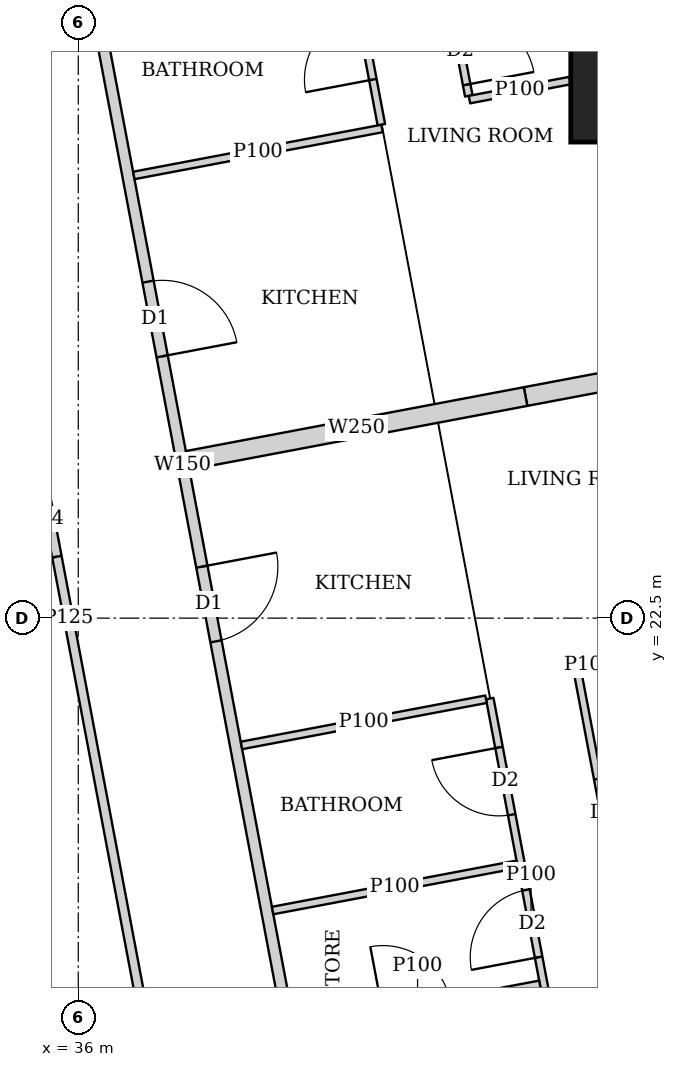
"""IFC4 building model, lengths in metres.
Left out: names, types, materials, properties, quantities, classifications, styles, units other than length and angle.
Written with IfcOpenShell. Run it as: python <this file> out.ifc"""

import sys

from ifc_helpers import new_model, si_unit, direction, frame, frame_2d, origin, origin_2d, place, context, subcontext, project, spatial, rectangle, extrude, element, fill, save


model = new_model("IFC4")
c1 = context("Model", 3, precision=1e-05, world=origin(), true_north=direction((0.0, 1.0)))
c2 = subcontext(c1, "Body", "Model", "MODEL_VIEW")
j1 = project(units=[si_unit("LENGTHUNIT", "METRE"), si_unit("PLANEANGLEUNIT", "RADIAN")], contexts=[c1])
p1 = place(None, origin())
s1 = spatial("IfcSite", under=j1, at=p1, CompositionType="ELEMENT")
p2 = place(p1, origin())
s2 = spatial("IfcBuilding", under=s1, at=p2, CompositionType="ELEMENT")
p3 = place(p2, frame((0.0, 0.0, 266.6)))
s3 = spatial("IfcBuildingStorey", under=s2, at=p3, CompositionType="ELEMENT", Elevation=266.6)
p4 = place(p3, frame((43.48, 29.763, 0.0), z_axis=(0.0, 0.0, 1.0), x_axis=(1.0, 0.0, 0.0)))
e1 = element("IfcColumn", 1, at=p4, inside=s3, PredefinedType="COLUMN", context=c2, shape_type="SweptSolid", body=[
    extrude(rectangle(XDim=2.0, YDim=2.0, at=origin_2d()), origin(), (0.0, 0.0, 1.0), 3.75),
])
p5 = place(p3, frame((34.036, 42.186, 0.0), z_axis=(0.0, 0.0, 1.0), x_axis=(0.185593518645, -0.9826266055, 0.0)))
e2 = element("IfcWall", 2, at=p5, inside=s3, PredefinedType="SOLIDWALL", context=c2, shape_type="SweptSolid", body=[
    extrude(rectangle(XDim=35.961, YDim=0.15, at=frame_2d((17.98, 0.0))), origin(), (0.0, 0.0, 1.0), 2.5),
])
p6 = place(p5, frame((15.529, 0.0, 0.0)))
e3 = element("IfcOpeningElement", 3, at=p6, cuts=e2, PredefinedType="OPENING", context=c2, shape_type="SweptSolid", body=[
    extrude(rectangle(XDim=1.0, YDim=2.1, at=frame_2d((0.5, 1.05))), frame((0.0, 0.085, 0.0), z_axis=(0.0, -1.0, 0.0), x_axis=(1.0, 0.0, 0.0)), (0.0, 0.0, 1.0), 0.17),
])
p7 = place(p5, frame((19.345, 0.0, 0.0)))
e4 = element("IfcOpeningElement", 4, at=p7, cuts=e2, PredefinedType="OPENING", context=c2, shape_type="SweptSolid", body=[
    extrude(rectangle(XDim=1.0, YDim=2.1, at=frame_2d((0.5, 1.05))), frame((0.0, 0.085, 0.0), z_axis=(0.0, -1.0, 0.0), x_axis=(1.0, 0.0, 0.0)), (0.0, 0.0, 1.0), 0.17),
])
p8 = place(p5, frame((30.594, 0.0, 0.0)))
e5 = element("IfcOpeningElement", 5, at=p8, cuts=e2, PredefinedType="OPENING", context=c2, shape_type="SweptSolid", body=[
    extrude(rectangle(XDim=1.0, YDim=2.1, at=frame_2d((0.5, 1.05))), frame((0.0, 0.085, 0.0), z_axis=(0.0, -1.0, 0.0), x_axis=(1.0, 0.0, 0.0)), (0.0, 0.0, 1.0), 0.17),
])
p9 = place(p3, frame((38.744, 42.045, 0.0), z_axis=(0.0, 0.0, 1.0), x_axis=(0.185614085367, -0.982622720739, 0.0)))
e6 = element("IfcWall", 6, at=p9, inside=s3, PredefinedType="PARTITIONING", context=c2, shape_type="SweptSolid", body=[
    extrude(rectangle(XDim=12.898, YDim=0.1, at=frame_2d((6.449, 0.0))), origin(), (0.0, 0.0, 1.0), 2.5),
])
p10 = place(p9, frame((11.848, 0.0, 0.0)))
e7 = element("IfcOpeningElement", 7, at=p10, cuts=e6, PredefinedType="OPENING", context=c2, shape_type="SweptSolid", body=[
    extrude(rectangle(XDim=0.9, YDim=2.1, at=frame_2d((0.45, 1.05))), frame((0.0, 0.06, 0.0), z_axis=(0.0, -1.0, 0.0), x_axis=(1.0, 0.0, 0.0)), (0.0, 0.0, 1.0), 0.12),
])
p11 = place(p9, frame((8.191, 0.0, 0.0)))
e8 = element("IfcOpeningElement", 8, at=p11, cuts=e6, PredefinedType="OPENING", context=c2, shape_type="SweptSolid", body=[
    extrude(rectangle(XDim=0.9, YDim=2.1, at=frame_2d((0.45, 1.05))), frame((0.0, 0.06, 0.0), z_axis=(0.0, -1.0, 0.0), x_axis=(1.0, 0.0, 0.0)), (0.0, 0.0, 1.0), 0.12),
])
p12 = place(p9, frame((4.215, 0.0, 0.0)))
e9 = element("IfcOpeningElement", 9, at=p12, cuts=e6, PredefinedType="OPENING", context=c2, shape_type="SweptSolid", body=[
    extrude(rectangle(XDim=0.9, YDim=2.1, at=frame_2d((0.45, 1.05))), frame((0.0, 0.06, 0.0), z_axis=(0.0, -1.0, 0.0), x_axis=(1.0, 0.0, 0.0)), (0.0, 0.0, 1.0), 0.12),
])
p13 = place(p3, frame((37.511, 42.109, 0.0), z_axis=(0.0, 0.0, 1.0), x_axis=(0.185550464988, -0.982634736279, 0.0)))
e10 = element("IfcWall", 10, at=p13, inside=s3, PredefinedType="PARTITIONING", context=c2, shape_type="SweptSolid", body=[
    extrude(rectangle(XDim=13.35, YDim=0.1, at=frame_2d((6.675, 0.0))), origin(), (0.0, 0.0, 1.0), 2.5),
])
p14 = place(p13, frame((11.845, 0.0, 0.0)))
e11 = element("IfcOpeningElement", 11, at=p14, cuts=e10, PredefinedType="OPENING", context=c2, shape_type="SweptSolid", body=[
    extrude(rectangle(XDim=0.9, YDim=2.1, at=frame_2d((0.45, 1.05))), frame((0.0, 0.06, 0.0), z_axis=(0.0, -1.0, 0.0), x_axis=(1.0, 0.0, 0.0)), (0.0, 0.0, 1.0), 0.12),
])
p15 = place(p13, frame((8.224, 0.0, 0.0)))
e12 = element("IfcOpeningElement", 12, at=p15, cuts=e10, PredefinedType="OPENING", context=c2, shape_type="SweptSolid", body=[
    extrude(rectangle(XDim=0.9, YDim=2.1, at=frame_2d((0.45, 1.05))), frame((0.0, 0.06, 0.0), z_axis=(0.0, -1.0, 0.0), x_axis=(1.0, 0.0, 0.0)), (0.0, 0.0, 1.0), 0.12),
])
p16 = place(p13, frame((2.65, 0.0, 0.0)))
e13 = element("IfcOpeningElement", 13, at=p16, cuts=e10, PredefinedType="OPENING", context=c2, shape_type="SweptSolid", body=[
    extrude(rectangle(XDim=0.9, YDim=2.1, at=frame_2d((0.45, 1.05))), frame((0.0, 0.06, 0.0), z_axis=(0.0, -1.0, 0.0), x_axis=(1.0, 0.0, 0.0)), (0.0, 0.0, 1.0), 0.12),
])
p17 = place(p13, frame((9.936, 0.0, 0.0)))
e14 = element("IfcOpeningElement", 14, at=p17, cuts=e10, PredefinedType="OPENING", context=c2, shape_type="SweptSolid", body=[
    extrude(rectangle(XDim=0.9, YDim=2.1, at=frame_2d((0.45, 1.05))), frame((0.0, 0.06, 0.0), z_axis=(0.0, -1.0, 0.0), x_axis=(1.0, 0.0, 0.0)), (0.0, 0.0, 1.0), 0.12),
])
p18 = place(p13, frame((5.555, 0.0, 0.0)))
e15 = element("IfcOpeningElement", 15, at=p18, cuts=e10, PredefinedType="OPENING", context=c2, shape_type="SweptSolid", body=[
    extrude(rectangle(XDim=0.9, YDim=2.1, at=frame_2d((0.45, 1.05))), frame((0.0, 0.06, 0.0), z_axis=(0.0, -1.0, 0.0), x_axis=(1.0, 0.0, 0.0)), (0.0, 0.0, 1.0), 0.12),
])
p19 = place(p3, frame((42.47, 29.572, 0.0), z_axis=(0.0, 0.0, 1.0), x_axis=(-0.982610503289, -0.185678751683, 0.0)))
e16 = element("IfcWall", 16, at=p19, inside=s3, PredefinedType="PARTITIONING", context=c2, shape_type="SweptSolid", body=[
    extrude(rectangle(XDim=1.346, YDim=0.1, at=frame_2d((0.673, 0.0))), origin(), (0.0, 0.0, 1.0), 2.5),
])
p20 = place(p3, frame((39.997, 28.942, 0.0), z_axis=(0.0, 0.0, 1.0), x_axis=(-0.982569883123, -0.185893584556, 0.0)))
e17 = element("IfcWall", 17, at=p20, inside=s3, PredefinedType="PARTITIONING", context=c2, shape_type="SweptSolid", body=[
    extrude(rectangle(XDim=3.324, YDim=0.1, at=frame_2d((1.662, 0.0))), origin(), (0.0, 0.0, 1.0), 3.5),
])
p21 = place(p3, frame((42.566, 21.809, 0.0), z_axis=(0.0, 0.0, 1.0), x_axis=(0.185613526435, -0.98262282632, 0.0)))
e18 = element("IfcWall", 18, at=p21, inside=s3, PredefinedType="PARTITIONING", context=c2, shape_type="SweptSolid", body=[
    extrude(rectangle(XDim=6.207, YDim=0.1, at=frame_2d((3.104, 0.0))), origin(), (0.0, 0.0, 1.0), 2.5),
])
p22 = place(p21, frame((1.45, 0.0, 0.0)))
e19 = element("IfcOpeningElement", 19, at=p22, cuts=e18, PredefinedType="OPENING", context=c2, shape_type="SweptSolid", body=[
    extrude(rectangle(XDim=0.9, YDim=2.1, at=frame_2d((0.45, 1.05))), frame((0.0, 0.06, 0.0), z_axis=(0.0, -1.0, 0.0), x_axis=(1.0, 0.0, 0.0)), (0.0, 0.0, 1.0), 0.12),
])
p23 = place(p21, frame((4.163, 0.0, 0.0)))
e20 = element("IfcOpeningElement", 20, at=p23, cuts=e18, PredefinedType="OPENING", context=c2, shape_type="SweptSolid", body=[
    extrude(rectangle(XDim=0.9, YDim=2.1, at=frame_2d((0.45, 1.05))), frame((0.0, 0.06, 0.0), z_axis=(0.0, -1.0, 0.0), x_axis=(1.0, 0.0, 0.0)), (0.0, 0.0, 1.0), 0.12),
])
p24 = place(p3, frame((41.414, 21.442, 0.0), z_axis=(0.0, 0.0, 1.0), x_axis=(0.185698675093, -0.982606738257, 0.0)))
e21 = element("IfcWall", 21, at=p24, inside=s3, PredefinedType="PARTITIONING", context=c2, shape_type="SweptSolid", body=[
    extrude(rectangle(XDim=5.843, YDim=0.1, at=frame_2d((2.921, 0.0))), origin(), (0.0, 0.0, 1.0), 3.5),
])
p25 = place(p24, frame((0.655, 0.0, 0.0)))
e22 = element("IfcOpeningElement", 22, at=p25, cuts=e21, PredefinedType="OPENING", context=c2, shape_type="SweptSolid", body=[
    extrude(rectangle(XDim=0.9, YDim=2.1, at=frame_2d((0.45, 1.05))), frame((0.0, 0.06, 0.0), z_axis=(0.0, -1.0, 0.0), x_axis=(1.0, 0.0, 0.0)), (0.0, 0.0, 1.0), 0.12),
])
p26 = place(p24, frame((2.563, 0.0, 0.0)))
e23 = element("IfcOpeningElement", 23, at=p26, cuts=e21, PredefinedType="OPENING", context=c2, shape_type="SweptSolid", body=[
    extrude(rectangle(XDim=0.9, YDim=2.1, at=frame_2d((0.45, 1.05))), frame((0.0, 0.06, 0.0), z_axis=(0.0, -1.0, 0.0), x_axis=(1.0, 0.0, 0.0)), (0.0, 0.0, 1.0), 0.12),
])
p27 = place(p3, frame((42.887, 21.921, 0.0), z_axis=(0.0, 0.0, 1.0), x_axis=(-0.982274918032, -0.187445953293, 0.0)))
e24 = element("IfcWall", 24, at=p27, inside=s3, PredefinedType="PARTITIONING", context=c2, shape_type="SweptSolid", body=[
    extrude(rectangle(XDim=0.336, YDim=0.1, at=frame_2d((0.168, 0.0))), origin(), (0.0, 0.0, 1.0), 2.5),
])
p28 = place(p3, frame((41.365, 21.433, 0.0), z_axis=(0.0, 0.0, 1.0), x_axis=(-0.982607026909, -0.185697147715, 0.0)))
e25 = element("IfcWall", 25, at=p28, inside=s3, PredefinedType="PARTITIONING", context=c2, shape_type="SweptSolid", body=[
    extrude(rectangle(XDim=3.275, YDim=0.1, at=frame_2d((1.637, 0.0))), origin(), (0.0, 0.0, 1.0), 3.5),
])
p29 = place(p3, frame((42.073, 17.682, 0.0), z_axis=(0.0, 0.0, 1.0), x_axis=(-0.982620626894, -0.185625169636, 0.0)))
e26 = element("IfcWall", 26, at=p29, inside=s3, PredefinedType="PARTITIONING", context=c2, shape_type="SweptSolid", body=[
    extrude(rectangle(XDim=3.275, YDim=0.1, at=frame_2d((1.637, 0.0))), origin(), (0.0, 0.0, 1.0), 3.5),
])
p30 = place(p29, frame((1.2, 0.0, 0.0)))
e27 = element("IfcOpeningElement", 27, at=p30, cuts=e26, PredefinedType="OPENING", context=c2, shape_type="SweptSolid", body=[
    extrude(rectangle(XDim=0.9, YDim=2.1, at=frame_2d((0.45, 1.05))), frame((0.0, 0.06, 0.0), z_axis=(0.0, -1.0, 0.0), x_axis=(1.0, 0.0, 0.0)), (0.0, 0.0, 1.0), 0.12),
])
p31 = place(p3, frame((41.775, 19.261, 0.0), z_axis=(0.0, 0.0, 1.0), x_axis=(-0.982620626894, -0.185625169636, 0.0)))
e28 = element("IfcWall", 28, at=p31, inside=s3, PredefinedType="PARTITIONING", context=c2, shape_type="SweptSolid", body=[
    extrude(rectangle(XDim=3.275, YDim=0.1, at=frame_2d((1.637, 0.0))), origin(), (0.0, 0.0, 1.0), 3.5),
])
p32 = place(p3, frame((46.11, 26.213, 0.0), z_axis=(0.0, 0.0, 1.0), x_axis=(-0.982633535512, -0.185556823879, 0.0)))
e29 = element("IfcWall", 29, at=p32, inside=s3, PredefinedType="SOLIDWALL", context=c2, shape_type="SweptSolid", body=[
    extrude(rectangle(XDim=4.3, YDim=0.25, at=frame_2d((2.15, 0.0))), origin(), (0.0, 0.0, 1.0), 2.5),
])
p33 = place(p3, frame((41.885, 25.415, 0.0), z_axis=(0.0, 0.0, 1.0), x_axis=(-0.982612837616, -0.185666398014, 0.0)))
e30 = element("IfcWall", 30, at=p33, inside=s3, PredefinedType="SOLIDWALL", context=c2, shape_type="SweptSolid", body=[
    extrude(rectangle(XDim=4.525, YDim=0.25, at=frame_2d((2.262, 0.0))), origin(), (0.0, 0.0, 1.0), 3.5),
])
p34 = place(p3, frame((38.202, 10.163, 0.0), z_axis=(0.0, 0.0, 1.0), x_axis=(-0.185610321132, 0.982623431783, 0.0)))
e31 = element("IfcWall", 31, at=p34, inside=s3, PredefinedType="PARTITIONING", context=c2, shape_type="SweptSolid", body=[
    extrude(rectangle(XDim=25.111, YDim=0.125, at=frame_2d((12.556, 0.0))), origin(), (0.0, 0.0, 1.0), 2.5),
])
p35 = place(p34, frame((0.708, 0.0, 0.0)))
e32 = element("IfcOpeningElement", 32, at=p35, cuts=e31, PredefinedType="OPENING", context=c2, shape_type="SweptSolid", body=[
    extrude(rectangle(XDim=1.0, YDim=2.1, at=frame_2d((0.5, 1.05))), frame((0.0, 0.073, 0.0), z_axis=(0.0, -1.0, 0.0), x_axis=(1.0, 0.0, 0.0)), (0.0, 0.0, 1.0), 0.145),
])
p36 = place(p34, frame((5.9, 0.0, 0.0)))
e33 = element("IfcOpeningElement", 33, at=p36, cuts=e31, PredefinedType="OPENING", context=c2, shape_type="SweptSolid", body=[
    extrude(rectangle(XDim=1.0, YDim=2.1, at=frame_2d((0.5, 1.05))), frame((0.0, 0.073, 0.0), z_axis=(0.0, -1.0, 0.0), x_axis=(1.0, 0.0, 0.0)), (0.0, 0.0, 1.0), 0.145),
])
p37 = place(p34, frame((13.378, 0.0, 0.0)))
e34 = element("IfcOpeningElement", 34, at=p37, cuts=e31, PredefinedType="OPENING", context=c2, shape_type="SweptSolid", body=[
    extrude(rectangle(XDim=1.0, YDim=2.1, at=frame_2d((0.5, 1.05))), frame((0.0, 0.073, 0.0), z_axis=(0.0, -1.0, 0.0), x_axis=(1.0, 0.0, 0.0)), (0.0, 0.0, 1.0), 0.145),
])
p38 = place(p34, frame((17.194, 0.0, 0.0)))
e35 = element("IfcOpeningElement", 35, at=p38, cuts=e31, PredefinedType="OPENING", context=c2, shape_type="SweptSolid", body=[
    extrude(rectangle(XDim=1.0, YDim=2.1, at=frame_2d((0.5, 1.05))), frame((0.0, 0.073, 0.0), z_axis=(0.0, -1.0, 0.0), x_axis=(1.0, 0.0, 0.0)), (0.0, 0.0, 1.0), 0.145),
])
p39 = place(p34, frame((21.15, 0.0, 0.0)))
e36 = element("IfcOpeningElement", 36, at=p39, cuts=e31, PredefinedType="OPENING", context=c2, shape_type="SweptSolid", body=[
    extrude(rectangle(XDim=1.0, YDim=2.1, at=frame_2d((0.5, 1.05))), frame((0.0, 0.073, 0.0), z_axis=(0.0, -1.0, 0.0), x_axis=(1.0, 0.0, 0.0)), (0.0, 0.0, 1.0), 0.145),
])
p40 = place(p3, frame((33.701, 22.5, 0.0), z_axis=(0.0, 0.0, 1.0), x_axis=(1.0, 0.0, 0.0)))
e37 = element("IfcWall", 37, at=p40, inside=s3, PredefinedType="PARTITIONING", context=c2, shape_type="SweptSolid", body=[
    extrude(rectangle(XDim=2.095, YDim=0.125, at=frame_2d((1.047, 0.0))), origin(), (0.0, 0.0, 1.0), 2.5),
])
p41 = place(p10, origin())
e38 = element("IfcDoor", 38, at=p41, inside=s3, OperationType="SINGLE_SWING_RIGHT", PredefinedType="DOOR", context=c2, shape_type="SweptSolid", body=[
    extrude(rectangle(XDim=0.9, YDim=2.1, at=frame_2d((0.45, 1.05))), frame((0.0, 0.025, 0.0), z_axis=(0.0, -1.0, 0.0), x_axis=(1.0, 0.0, 0.0)), (0.0, 0.0, 1.0), 0.05),
])
fill(e7, e38)
p42 = place(p14, origin())
e39 = element("IfcDoor", 39, at=p42, inside=s3, OperationType="SINGLE_SWING_LEFT", PredefinedType="DOOR", context=c2, shape_type="SweptSolid", body=[
    extrude(rectangle(XDim=0.9, YDim=2.1, at=frame_2d((0.45, 1.05))), frame((0.0, 0.025, 0.0), z_axis=(0.0, -1.0, 0.0), x_axis=(1.0, 0.0, 0.0)), (0.0, 0.0, 1.0), 0.05),
])
fill(e11, e39)
p43 = place(p6, origin())
e40 = element("IfcDoor", 40, at=p43, inside=s3, OperationType="SINGLE_SWING_RIGHT", PredefinedType="DOOR", context=c2, shape_type="SweptSolid", body=[
    extrude(rectangle(XDim=1.0, YDim=2.1, at=frame_2d((0.5, 1.05))), frame((0.0, 0.025, 0.0), z_axis=(0.0, -1.0, 0.0), x_axis=(1.0, 0.0, 0.0)), (0.0, 0.0, 1.0), 0.05),
])
fill(e3, e40)
p44 = place(p22, origin())
e41 = element("IfcDoor", 41, at=p44, inside=s3, OperationType="SINGLE_SWING_LEFT", PredefinedType="DOOR", context=c2, shape_type="SweptSolid", body=[
    extrude(rectangle(XDim=0.9, YDim=2.1, at=frame_2d((0.45, 1.05))), frame((0.0, 0.025, 0.0), z_axis=(0.0, -1.0, 0.0), x_axis=(1.0, 0.0, 0.0)), (0.0, 0.0, 1.0), 0.05),
])
fill(e19, e41)
p45 = place(p25, origin())
e42 = element("IfcDoor", 42, at=p45, inside=s3, OperationType="SINGLE_SWING_RIGHT", PredefinedType="DOOR", context=c2, shape_type="SweptSolid", body=[
    extrude(rectangle(XDim=0.9, YDim=2.1, at=frame_2d((0.45, 1.05))), frame((0.0, 0.025, 0.0), z_axis=(0.0, -1.0, 0.0), x_axis=(1.0, 0.0, 0.0)), (0.0, 0.0, 1.0), 0.05),
])
fill(e22, e42)
p46 = place(p26, origin())
e43 = element("IfcDoor", 43, at=p46, inside=s3, OperationType="SINGLE_SWING_LEFT", PredefinedType="DOOR", context=c2, shape_type="SweptSolid", body=[
    extrude(rectangle(XDim=0.9, YDim=2.1, at=frame_2d((0.45, 1.05))), frame((0.0, 0.025, 0.0), z_axis=(0.0, -1.0, 0.0), x_axis=(1.0, 0.0, 0.0)), (0.0, 0.0, 1.0), 0.05),
])
fill(e23, e43)
p47 = place(p7, origin())
e44 = element("IfcDoor", 44, at=p47, inside=s3, OperationType="SINGLE_SWING_LEFT", PredefinedType="DOOR", context=c2, shape_type="SweptSolid", body=[
    extrude(rectangle(XDim=1.0, YDim=2.1, at=frame_2d((0.5, 1.05))), frame((0.0, 0.025, 0.0), z_axis=(0.0, -1.0, 0.0), x_axis=(1.0, 0.0, 0.0)), (0.0, 0.0, 1.0), 0.05),
])
fill(e4, e44)
p48 = place(p37, origin())
e45 = element("IfcDoor", 45, at=p48, inside=s3, OperationType="SINGLE_SWING_LEFT", PredefinedType="DOOR", context=c2, shape_type="SweptSolid", body=[
    extrude(rectangle(XDim=1.0, YDim=2.1, at=frame_2d((0.5, 1.05))), frame((0.0, 0.025, 0.0), z_axis=(0.0, -1.0, 0.0), x_axis=(1.0, 0.0, 0.0)), (0.0, 0.0, 1.0), 0.05),
])
fill(e34, e45)
save(model, sys.argv[1])
